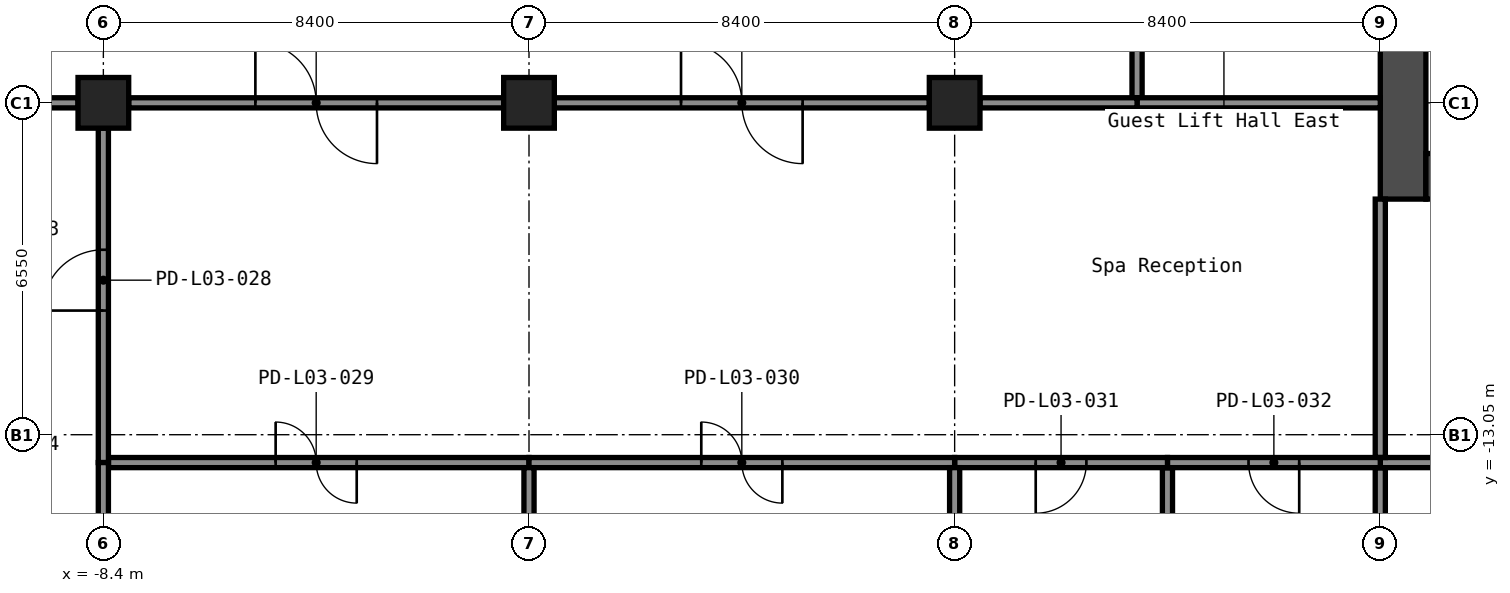
"""IFC4 building model, lengths in metres.
Left out: names, types, materials, properties, quantities, classifications, styles, units other than length and angle.
Written with IfcOpenShell. Run it as: python <this file> out.ifc"""

import sys

from ifc_helpers import new_model, si_unit, direction, frame, frame_2d, origin, origin_2d, place, context, subcontext, project, spatial, rectangle, hollow_rectangle, extrude, element, fill, save


model = new_model("IFC4")
c1 = context("Model", 3, precision=1e-05, world=origin(), true_north=direction((0.0, 1.0)))
c2 = subcontext(c1, "Body", "Model", "MODEL_VIEW")
j1 = project(units=[si_unit("LENGTHUNIT", "METRE"), si_unit("PLANEANGLEUNIT", "RADIAN")], contexts=[c1])
p1 = place(None, origin())
s1 = spatial("IfcSite", under=j1, at=p1, CompositionType="ELEMENT")
p2 = place(p1, origin())
s2 = spatial("IfcBuilding", under=s1, at=p2, CompositionType="ELEMENT")
p3 = place(p2, frame((0.0, 0.0, 15.0)))
s3 = spatial("IfcBuildingStorey", under=s2, at=p3, CompositionType="ELEMENT", Elevation=15.0)
for number, where, z_axis, x_axis in (
    (1, (-8.4, -6.5, 0.0), (0.0, 0.0, 1.0), (1.0, 0.0, 0.0)),
    (2, (0.0, -6.5, 0.0), (0.0, 0.0, 1.0), (1.0, 0.0, 0.0)),
    (3, (8.4, -6.5, 0.0), (0.0, 0.0, 1.0), (1.0, 0.0, 0.0)),
):
    element("IfcColumn", number, at=place(p3, frame(where, z_axis=z_axis, x_axis=x_axis)), inside=s3, PredefinedType="COLUMN", context=c2, shape_type="SweptSolid", body=[
        extrude(hollow_rectangle(XDim=1.0, YDim=1.0, WallThickness=0.04, at=origin_2d()), origin(), (0.0, 0.0, 1.0), 4.4),
    ])
p4 = place(p3, frame((17.25, -8.4, 0.0), z_axis=(0.0, 0.0, 1.0), x_axis=(0.0, 1.0, 0.0)))
e4 = element("IfcWall", 4, at=p4, inside=s3, PredefinedType="SHEAR", context=c2, shape_type="SweptSolid", body=[
    extrude(rectangle(XDim=16.8, YDim=0.9, at=frame_2d((8.4, 0.0))), origin(), (0.0, 0.0, 1.0), 4.4),
])
p5 = place(p4, frame((3.4, 0.0, 0.0)))
e5 = element("IfcOpeningElement", 5, at=p5, cuts=e4, PredefinedType="OPENING", context=c2, shape_type="SweptSolid", body=[
    extrude(rectangle(XDim=1.6, YDim=2.1, at=frame_2d((0.8, 1.05))), frame((0.0, 0.46, 0.0), z_axis=(0.0, -1.0, 0.0), x_axis=(1.0, 0.0, 0.0)), (0.0, 0.0, 1.0), 0.92),
])
p6 = place(p4, frame((9.6, 0.0, 0.0)))
e6 = element("IfcOpeningElement", 6, at=p6, cuts=e4, PredefinedType="OPENING", context=c2, shape_type="SweptSolid", body=[
    extrude(rectangle(XDim=1.6, YDim=2.1, at=frame_2d((0.8, 1.05))), frame((0.0, 0.46, 0.0), z_axis=(0.0, -1.0, 0.0), x_axis=(1.0, 0.0, 0.0)), (0.0, 0.0, 1.0), 0.92),
])
p7 = place(p4, frame((11.8, 0.0, 0.0)))
e7 = element("IfcOpeningElement", 7, at=p7, cuts=e4, PredefinedType="OPENING", context=c2, shape_type="SweptSolid", body=[
    extrude(rectangle(XDim=1.6, YDim=2.1, at=frame_2d((0.8, 1.05))), frame((0.0, 0.46, 0.0), z_axis=(0.0, -1.0, 0.0), x_axis=(1.0, 0.0, 0.0)), (0.0, 0.0, 1.0), 0.92),
])
p8 = place(p3, frame((17.7, -7.95, 0.0), z_axis=(0.0, 0.0, 1.0), x_axis=(1.0, 0.0, 0.0)))
e8 = element("IfcWall", 8, at=p8, inside=s3, PredefinedType="SHEAR", context=c2, shape_type="SweptSolid", body=[
    extrude(rectangle(XDim=15.0, YDim=0.9, at=frame_2d((7.5, 0.0))), origin(), (0.0, 0.0, 1.0), 4.4),
])
p9 = place(p8, frame((2.55, 0.0, 0.0)))
e9 = element("IfcOpeningElement", 9, at=p9, cuts=e8, PredefinedType="OPENING", context=c2, shape_type="SweptSolid", body=[
    extrude(rectangle(XDim=1.0, YDim=2.1, at=frame_2d((0.5, 1.05))), frame((0.0, 0.46, 0.0), z_axis=(0.0, -1.0, 0.0), x_axis=(1.0, 0.0, 0.0)), (0.0, 0.0, 1.0), 0.92),
])
p10 = place(p3, frame((16.8, -13.7, 0.0), z_axis=(0.0, 0.0, 1.0), x_axis=(0.0, -1.0, 0.0)))
e10 = element("IfcWall", 10, at=p10, inside=s3, PredefinedType="PARTITIONING", context=c2, shape_type="SweptSolid", body=[
    extrude(rectangle(XDim=5.45, YDim=0.2, at=frame_2d((2.725, 0.0))), origin(), (0.0, 0.0, 1.0), 4.4),
])
p11 = place(p3, frame((12.6, -13.7, 0.0), z_axis=(0.0, 0.0, 1.0), x_axis=(0.0, -1.0, 0.0)))
e11 = element("IfcWall", 11, at=p11, inside=s3, PredefinedType="PARTITIONING", context=c2, shape_type="SweptSolid", body=[
    extrude(rectangle(XDim=11.15, YDim=0.2, at=frame_2d((5.575, 0.0))), origin(), (0.0, 0.0, 1.0), 4.4),
])
p12 = place(p3, frame((25.2, -13.6, 0.0), z_axis=(0.0, 0.0, 1.0), x_axis=(-1.0, 0.0, 0.0)))
e12 = element("IfcWall", 12, at=p12, inside=s3, PredefinedType="PARTITIONING", context=c2, shape_type="SweptSolid", body=[
    extrude(rectangle(XDim=8.4, YDim=0.2, at=frame_2d((4.2, 0.0))), origin(), (0.0, 0.0, 1.0), 4.4),
])
p13 = place(p12, frame((3.7, 0.0, 0.0)))
e13 = element("IfcOpeningElement", 13, at=p13, cuts=e12, PredefinedType="OPENING", context=c2, shape_type="SweptSolid", body=[
    extrude(rectangle(XDim=1.0, YDim=2.1, at=frame_2d((0.5, 1.05))), frame((0.0, 0.11, 0.0), z_axis=(0.0, -1.0, 0.0), x_axis=(1.0, 0.0, 0.0)), (0.0, 0.0, 1.0), 0.22),
])
p14 = place(p3, frame((16.8, -13.5, 0.0), z_axis=(0.0, 0.0, 1.0), x_axis=(0.0, 1.0, 0.0)))
e14 = element("IfcWall", 14, at=p14, inside=s3, PredefinedType="PARTITIONING", context=c2, shape_type="SweptSolid", body=[
    extrude(rectangle(XDim=5.1, YDim=0.2, at=frame_2d((2.55, 0.0))), origin(), (0.0, 0.0, 1.0), 4.4),
])
p15 = place(p3, frame((12.0, -6.4, 0.0), z_axis=(0.0, 0.0, 1.0), x_axis=(0.0, 1.0, 0.0)))
e15 = element("IfcWall", 15, at=p15, inside=s3, PredefinedType="PARTITIONING", context=c2, shape_type="SweptSolid", body=[
    extrude(rectangle(XDim=12.8, YDim=0.2, at=frame_2d((6.4, 0.0))), origin(), (0.0, 0.0, 1.0), 4.4),
])
p16 = place(p15, frame((5.2, 0.0, 0.0)))
e16 = element("IfcOpeningElement", 16, at=p16, cuts=e15, PredefinedType="OPENING", context=c2, shape_type="SweptSolid", body=[
    extrude(rectangle(XDim=2.4, YDim=2.1, at=frame_2d((1.2, 1.05))), frame((0.0, 0.11, 0.0), z_axis=(0.0, -1.0, 0.0), x_axis=(1.0, 0.0, 0.0)), (0.0, 0.0, 1.0), 0.22),
])
p17 = place(p3, frame((16.8, -6.5, 0.0), z_axis=(0.0, 0.0, 1.0), x_axis=(-1.0, 0.0, 0.0)))
e17 = element("IfcWall", 17, at=p17, inside=s3, PredefinedType="PARTITIONING", context=c2, shape_type="SweptSolid", body=[
    extrude(rectangle(XDim=4.8, YDim=0.2, at=frame_2d((2.4, 0.0))), origin(), (0.0, 0.0, 1.0), 4.4),
])
p18 = place(p3, frame((12.0, -6.5, 0.0), z_axis=(0.0, 0.0, 1.0), x_axis=(-1.0, 0.0, 0.0)))
e18 = element("IfcWall", 18, at=p18, inside=s3, PredefinedType="PARTITIONING", context=c2, shape_type="SweptSolid", body=[
    extrude(rectangle(XDim=3.1, YDim=0.2, at=frame_2d((1.55, 0.0))), origin(), (0.0, 0.0, 1.0), 4.4),
])
p19 = place(p3, frame((7.9, -6.5, 0.0), z_axis=(0.0, 0.0, 1.0), x_axis=(-1.0, 0.0, 0.0)))
e19 = element("IfcWall", 19, at=p19, inside=s3, PredefinedType="PARTITIONING", context=c2, shape_type="SweptSolid", body=[
    extrude(rectangle(XDim=7.4, YDim=0.2, at=frame_2d((3.7, 0.0))), origin(), (0.0, 0.0, 1.0), 4.4),
])
p20 = place(p19, frame((2.5, 0.0, 0.0)))
e20 = element("IfcOpeningElement", 20, at=p20, cuts=e19, PredefinedType="OPENING", context=c2, shape_type="SweptSolid", body=[
    extrude(rectangle(XDim=2.4, YDim=2.1, at=frame_2d((1.2, 1.05))), frame((0.0, 0.11, 0.0), z_axis=(0.0, -1.0, 0.0), x_axis=(1.0, 0.0, 0.0)), (0.0, 0.0, 1.0), 0.22),
])
p21 = place(p3, frame((-0.5, -6.5, 0.0), z_axis=(0.0, 0.0, 1.0), x_axis=(-1.0, 0.0, 0.0)))
e21 = element("IfcWall", 21, at=p21, inside=s3, PredefinedType="PARTITIONING", context=c2, shape_type="SweptSolid", body=[
    extrude(rectangle(XDim=7.4, YDim=0.2, at=frame_2d((3.7, 0.0))), origin(), (0.0, 0.0, 1.0), 4.4),
])
p22 = place(p21, frame((2.5, 0.0, 0.0)))
e22 = element("IfcOpeningElement", 22, at=p22, cuts=e21, PredefinedType="OPENING", context=c2, shape_type="SweptSolid", body=[
    extrude(rectangle(XDim=2.4, YDim=2.1, at=frame_2d((1.2, 1.05))), frame((0.0, 0.11, 0.0), z_axis=(0.0, -1.0, 0.0), x_axis=(1.0, 0.0, 0.0)), (0.0, 0.0, 1.0), 0.22),
])
p23 = place(p3, frame((16.8, -13.6, 0.0), z_axis=(0.0, 0.0, 1.0), x_axis=(-1.0, 0.0, 0.0)))
e23 = element("IfcWall", 23, at=p23, inside=s3, PredefinedType="PARTITIONING", context=c2, shape_type="SweptSolid", body=[
    extrude(rectangle(XDim=4.2, YDim=0.2, at=frame_2d((2.1, 0.0))), origin(), (0.0, 0.0, 1.0), 4.4),
])
p24 = place(p23, frame((1.6, 0.0, 0.0)))
e24 = element("IfcOpeningElement", 24, at=p24, cuts=e23, PredefinedType="OPENING", context=c2, shape_type="SweptSolid", body=[
    extrude(rectangle(XDim=1.0, YDim=2.1, at=frame_2d((0.5, 1.05))), frame((0.0, 0.11, 0.0), z_axis=(0.0, -1.0, 0.0), x_axis=(1.0, 0.0, 0.0)), (0.0, 0.0, 1.0), 0.22),
])
p25 = place(p3, frame((12.6, -13.6, 0.0), z_axis=(0.0, 0.0, 1.0), x_axis=(-1.0, 0.0, 0.0)))
e25 = element("IfcWall", 25, at=p25, inside=s3, PredefinedType="PARTITIONING", context=c2, shape_type="SweptSolid", body=[
    extrude(rectangle(XDim=4.2, YDim=0.2, at=frame_2d((2.1, 0.0))), origin(), (0.0, 0.0, 1.0), 4.4),
])
p26 = place(p25, frame((1.6, 0.0, 0.0)))
e26 = element("IfcOpeningElement", 26, at=p26, cuts=e25, PredefinedType="OPENING", context=c2, shape_type="SweptSolid", body=[
    extrude(rectangle(XDim=1.0, YDim=2.1, at=frame_2d((0.5, 1.05))), frame((0.0, 0.11, 0.0), z_axis=(0.0, -1.0, 0.0), x_axis=(1.0, 0.0, 0.0)), (0.0, 0.0, 1.0), 0.22),
])
p27 = place(p3, frame((0.0, -13.6, 0.0), z_axis=(0.0, 0.0, 1.0), x_axis=(-1.0, 0.0, 0.0)))
e27 = element("IfcWall", 27, at=p27, inside=s3, PredefinedType="PARTITIONING", context=c2, shape_type="SweptSolid", body=[
    extrude(rectangle(XDim=8.3, YDim=0.2, at=frame_2d((4.15, 0.0))), origin(), (0.0, 0.0, 1.0), 4.4),
])
p28 = place(p27, frame((3.4, 0.0, 0.0)))
e28 = element("IfcOpeningElement", 28, at=p28, cuts=e27, PredefinedType="OPENING", context=c2, shape_type="SweptSolid", body=[
    extrude(rectangle(XDim=1.6, YDim=2.1, at=frame_2d((0.8, 1.05))), frame((0.0, 0.11, 0.0), z_axis=(0.0, -1.0, 0.0), x_axis=(1.0, 0.0, 0.0)), (0.0, 0.0, 1.0), 0.22),
])
p29 = place(p3, frame((8.4, -13.6, 0.0), z_axis=(0.0, 0.0, 1.0), x_axis=(-1.0, 0.0, 0.0)))
e29 = element("IfcWall", 29, at=p29, inside=s3, PredefinedType="PARTITIONING", context=c2, shape_type="SweptSolid", body=[
    extrude(rectangle(XDim=8.4, YDim=0.2, at=frame_2d((4.2, 0.0))), origin(), (0.0, 0.0, 1.0), 4.4),
])
p30 = place(p29, frame((3.4, 0.0, 0.0)))
e30 = element("IfcOpeningElement", 30, at=p30, cuts=e29, PredefinedType="OPENING", context=c2, shape_type="SweptSolid", body=[
    extrude(rectangle(XDim=1.6, YDim=2.1, at=frame_2d((0.8, 1.05))), frame((0.0, 0.11, 0.0), z_axis=(0.0, -1.0, 0.0), x_axis=(1.0, 0.0, 0.0)), (0.0, 0.0, 1.0), 0.22),
])
p31 = place(p3, frame((-12.0, -6.5, 0.0), z_axis=(0.0, 0.0, 1.0), x_axis=(1.0, 0.0, 0.0)))
e31 = element("IfcWall", 31, at=p31, inside=s3, PredefinedType="PARTITIONING", context=c2, shape_type="SweptSolid", body=[
    extrude(rectangle(XDim=3.1, YDim=0.2, at=frame_2d((1.55, 0.0))), origin(), (0.0, 0.0, 1.0), 4.4),
])
p32 = place(p3, frame((-8.4, -7.0, 0.0), z_axis=(0.0, 0.0, 1.0), x_axis=(0.0, -1.0, 0.0)))
e32 = element("IfcWall", 32, at=p32, inside=s3, PredefinedType="PARTITIONING", context=c2, shape_type="SweptSolid", body=[
    extrude(rectangle(XDim=6.6, YDim=0.2, at=frame_2d((3.3, 0.0))), origin(), (0.0, 0.0, 1.0), 4.4),
])
p33 = place(p32, frame((2.4, 0.0, 0.0)))
e33 = element("IfcOpeningElement", 33, at=p33, cuts=e32, PredefinedType="OPENING", context=c2, shape_type="SweptSolid", body=[
    extrude(rectangle(XDim=1.2, YDim=2.1, at=frame_2d((0.6, 1.05))), frame((0.0, 0.11, 0.0), z_axis=(0.0, -1.0, 0.0), x_axis=(1.0, 0.0, 0.0)), (0.0, 0.0, 1.0), 0.22),
])
p34 = place(p3, frame((-8.4, -13.6, 0.0), z_axis=(0.0, 0.0, 1.0), x_axis=(0.0, -1.0, 0.0)))
e34 = element("IfcWall", 34, at=p34, inside=s3, PredefinedType="PARTITIONING", context=c2, shape_type="SweptSolid", body=[
    extrude(rectangle(XDim=5.55, YDim=0.2, at=frame_2d((2.775, 0.0))), origin(), (0.0, 0.0, 1.0), 4.4),
])
for number, where, z_axis, x_axis in (
    (35, (0.0, -13.7, 0.0), (0.0, 0.0, 1.0), (0.0, -1.0, 0.0)),
    (36, (8.4, -13.7, 0.0), (0.0, 0.0, 1.0), (0.0, -1.0, 0.0)),
):
    element("IfcWall", number, at=place(p3, frame(where, z_axis=z_axis, x_axis=x_axis)), inside=s3, PredefinedType="PARTITIONING", context=c2, shape_type="SweptSolid", body=[
        extrude(rectangle(XDim=5.45, YDim=0.2, at=frame_2d((2.725, 0.0))), origin(), (0.0, 0.0, 1.0), 4.4),
    ])
p35 = place(p20, origin())
e37 = element("IfcDoor", 37, at=p35, inside=s3, OperationType="DOUBLE_DOOR_DOUBLE_SWING", PredefinedType="DOOR", context=c2, shape_type="SweptSolid", body=[
    extrude(rectangle(XDim=2.4, YDim=2.1, at=frame_2d((1.2, 1.05))), frame((0.0, 0.025, 0.0), z_axis=(0.0, -1.0, 0.0), x_axis=(1.0, 0.0, 0.0)), (0.0, 0.0, 1.0), 0.05),
])
fill(e20, e37)
p36 = place(p22, origin())
e38 = element("IfcDoor", 38, at=p36, inside=s3, OperationType="DOUBLE_DOOR_DOUBLE_SWING", PredefinedType="DOOR", context=c2, shape_type="SweptSolid", body=[
    extrude(rectangle(XDim=2.4, YDim=2.1, at=frame_2d((1.2, 1.05))), frame((0.0, 0.025, 0.0), z_axis=(0.0, -1.0, 0.0), x_axis=(1.0, 0.0, 0.0)), (0.0, 0.0, 1.0), 0.05),
])
fill(e22, e38)
p37 = place(p33, origin())
e39 = element("IfcDoor", 39, at=p37, inside=s3, OperationType="SINGLE_SWING_RIGHT", PredefinedType="DOOR", context=c2, shape_type="SweptSolid", body=[
    extrude(rectangle(XDim=1.2, YDim=2.1, at=frame_2d((0.6, 1.05))), frame((0.0, 0.025, 0.0), z_axis=(0.0, -1.0, 0.0), x_axis=(1.0, 0.0, 0.0)), (0.0, 0.0, 1.0), 0.05),
])
fill(e33, e39)
p38 = place(p28, origin())
e40 = element("IfcDoor", 40, at=p38, inside=s3, OperationType="DOUBLE_DOOR_DOUBLE_SWING", PredefinedType="DOOR", context=c2, shape_type="SweptSolid", body=[
    extrude(rectangle(XDim=1.6, YDim=2.1, at=frame_2d((0.8, 1.05))), frame((0.0, 0.025, 0.0), z_axis=(0.0, -1.0, 0.0), x_axis=(1.0, 0.0, 0.0)), (0.0, 0.0, 1.0), 0.05),
])
fill(e28, e40)
p39 = place(p30, origin())
e41 = element("IfcDoor", 41, at=p39, inside=s3, OperationType="DOUBLE_DOOR_DOUBLE_SWING", PredefinedType="DOOR", context=c2, shape_type="SweptSolid", body=[
    extrude(rectangle(XDim=1.6, YDim=2.1, at=frame_2d((0.8, 1.05))), frame((0.0, 0.025, 0.0), z_axis=(0.0, -1.0, 0.0), x_axis=(1.0, 0.0, 0.0)), (0.0, 0.0, 1.0), 0.05),
])
fill(e30, e41)
p40 = place(p26, origin())
e42 = element("IfcDoor", 42, at=p40, inside=s3, OperationType="SINGLE_SWING_LEFT", PredefinedType="DOOR", context=c2, shape_type="SweptSolid", body=[
    extrude(rectangle(XDim=1.0, YDim=2.1, at=frame_2d((0.5, 1.05))), frame((0.0, 0.025, 0.0), z_axis=(0.0, -1.0, 0.0), x_axis=(1.0, 0.0, 0.0)), (0.0, 0.0, 1.0), 0.05),
])
fill(e26, e42)
p41 = place(p24, origin())
e43 = element("IfcDoor", 43, at=p41, inside=s3, OperationType="SINGLE_SWING_RIGHT", PredefinedType="DOOR", context=c2, shape_type="SweptSolid", body=[
    extrude(rectangle(XDim=1.0, YDim=2.1, at=frame_2d((0.5, 1.05))), frame((0.0, 0.025, 0.0), z_axis=(0.0, -1.0, 0.0), x_axis=(1.0, 0.0, 0.0)), (0.0, 0.0, 1.0), 0.05),
])
fill(e24, e43)
save(model, sys.argv[1])
